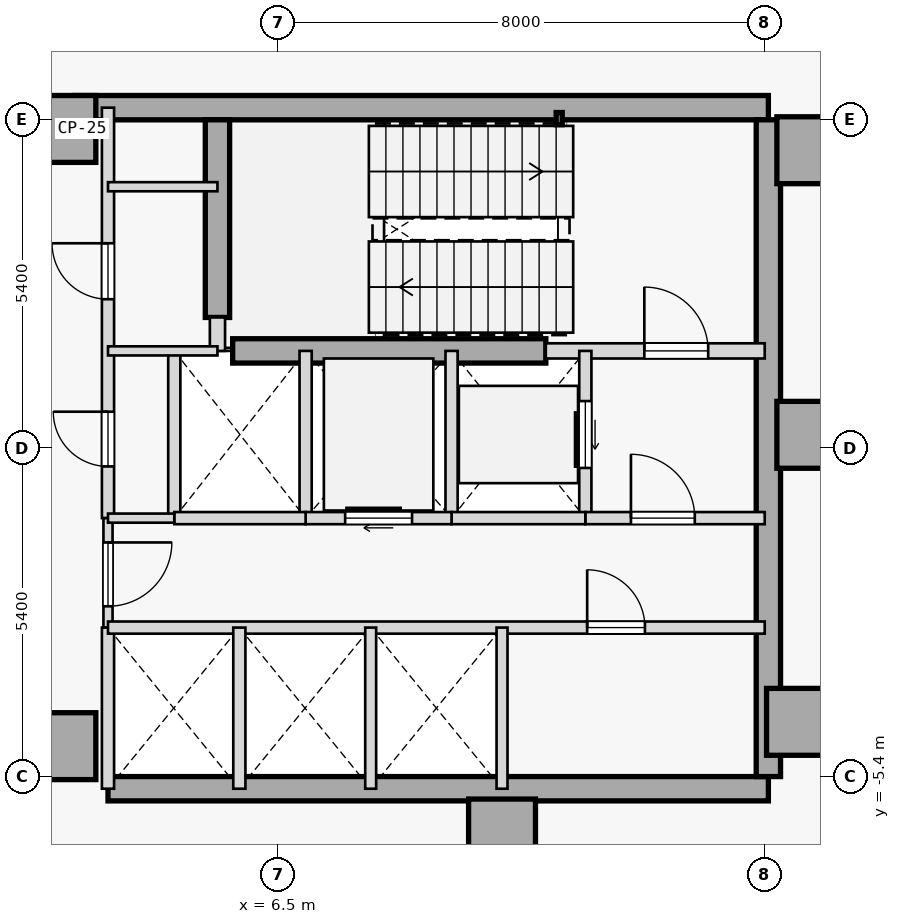
"""IFC4 building model, lengths in metres.
Left out: names, types, materials, properties, quantities, classifications, styles, units other than length and angle.
Written with IfcOpenShell. Run it as: python <this file> out.ifc"""

import sys

from ifc_helpers import new_model, si_unit, direction, frame, frame_2d, origin, origin_2d, place, context, subcontext, project, spatial, rectangle, hollow_rectangle, extrude, element, fill, save


model = new_model("IFC4")
c1 = context("Model", 3, precision=1e-05, world=origin(), true_north=direction((0.0, 1.0)))
c2 = subcontext(c1, "Body", "Model", "MODEL_VIEW")
j1 = project(units=[si_unit("LENGTHUNIT", "METRE"), si_unit("PLANEANGLEUNIT", "RADIAN")], contexts=[c1])
p1 = place(None, origin())
s1 = spatial("IfcSite", under=j1, at=p1, CompositionType="ELEMENT")
p2 = place(p1, origin())
s2 = spatial("IfcBuilding", under=s1, at=p2, CompositionType="ELEMENT")
p3 = place(p2, frame((0.0, 0.0, 202.4)))
s3 = spatial("IfcBuildingStorey", under=s2, at=p3, CompositionType="ELEMENT", Elevation=202.4)
for number, where, z_axis, x_axis in (
    (1, (15.25, 4.9, 0.0), (0.0, 0.0, 1.0), (1.0, 0.0, 0.0)),
    (2, (15.25, 0.22, 0.0), (0.0, 0.0, 1.0), (1.0, 0.0, 0.0)),
    (3, (15.08, -4.5, 0.0), (0.0, 0.0, 1.0), (1.0, 0.0, 0.0)),
    (4, (10.18, -6.32, 0.0), (0.0, 0.0, 1.0), (1.0, 0.0, 0.0)),
    (5, (2.95, -4.9, 0.0), (0.0, 0.0, 1.0), (1.0, 0.0, 0.0)),
    (6, (2.95, 5.25, 0.0), (0.0, 0.0, 1.0), (1.0, 0.0, 0.0)),
):
    element("IfcColumn", number, at=place(p3, frame(where, z_axis=z_axis, x_axis=x_axis)), inside=s3, PredefinedType="COLUMN", context=c2, shape_type="SweptSolid", body=[
        extrude(rectangle(XDim=1.1, YDim=1.1, at=origin_2d()), origin(), (0.0, 0.0, 1.0), 4.4),
    ])
p4 = place(p3, frame((3.15, 5.6, 0.0), z_axis=(0.0, 0.0, 1.0), x_axis=(1.0, 0.0, 0.0)))
e7 = element("IfcWall", 7, at=p4, inside=s3, PredefinedType="SHEAR", context=c2, shape_type="SweptSolid", body=[
    extrude(rectangle(XDim=11.41, YDim=0.4, at=frame_2d((5.705, 0.0))), origin(), (0.0, 0.0, 1.0), 4.15),
])
p5 = place(p3, frame((3.7, -5.6, 0.0), z_axis=(0.0, 0.0, 1.0), x_axis=(1.0, 0.0, 0.0)))
e8 = element("IfcWall", 8, at=p5, inside=s3, PredefinedType="SHEAR", context=c2, shape_type="SweptSolid", body=[
    extrude(rectangle(XDim=10.86, YDim=0.4, at=frame_2d((5.43, 0.0))), origin(), (0.0, 0.0, 1.0), 4.15),
])
p6 = place(p3, frame((14.56, -5.4, 0.0), z_axis=(0.0, 0.0, 1.0), x_axis=(0.0, 1.0, 0.0)))
e9 = element("IfcWall", 9, at=p6, inside=s3, PredefinedType="SHEAR", context=c2, shape_type="SweptSolid", body=[
    extrude(rectangle(XDim=10.8, YDim=0.4, at=frame_2d((5.4, 0.0))), origin(), (0.0, 0.0, 1.0), 4.15),
])
p7 = place(p3, frame((5.5, 2.15, 0.0), z_axis=(0.0, 0.0, 1.0), x_axis=(0.0, 1.0, 0.0)))
e10 = element("IfcWall", 10, at=p7, inside=s3, PredefinedType="SHEAR", context=c2, shape_type="SweptSolid", body=[
    extrude(rectangle(XDim=3.25, YDim=0.4, at=frame_2d((1.625, 0.0))), origin(), (0.0, 0.0, 1.0), 4.15),
])
p8 = place(p3, frame((5.75, 1.6, 0.0), z_axis=(0.0, 0.0, 1.0), x_axis=(1.0, 0.0, 0.0)))
e11 = element("IfcWall", 11, at=p8, inside=s3, PredefinedType="SHEAR", context=c2, shape_type="SweptSolid", body=[
    extrude(rectangle(XDim=5.15, YDim=0.4, at=frame_2d((2.575, 0.0))), origin(), (0.0, 0.0, 1.0), 4.15),
])
p9 = place(p3, frame((11.12, 5.42, 0.0), z_axis=(0.0, 0.0, 1.0), x_axis=(1.0, 0.0, 0.0)))
e12 = element("IfcColumn", 12, at=p9, inside=s3, PredefinedType="COLUMN", context=c2, shape_type="SweptSolid", body=[
    extrude(hollow_rectangle(XDim=0.1, YDim=0.2, WallThickness=0.008, at=origin_2d()), origin(), (0.0, 0.0, 1.0), 4.4),
])
p10 = place(p3, frame((10.9, 1.6, 0.0), z_axis=(0.0, 0.0, 1.0), x_axis=(1.0, 0.0, 0.0)))
e13 = element("IfcWall", 13, at=p10, inside=s3, PredefinedType="STANDARD", context=c2, shape_type="SweptSolid", body=[
    extrude(rectangle(XDim=3.6, YDim=0.25, at=frame_2d((1.8, 0.0))), origin(), (0.0, 0.0, 1.0), 4.15),
])
p11 = place(p10, frame((1.62, 0.0, 0.0)))
e14 = element("IfcOpeningElement", 14, at=p11, cuts=e13, PredefinedType="OPENING", context=c2, shape_type="SweptSolid", body=[
    extrude(rectangle(XDim=1.05, YDim=2.15, at=frame_2d((0.525, 1.075))), frame((0.0, 0.135, 0.0), z_axis=(0.0, -1.0, 0.0), x_axis=(1.0, 0.0, 0.0)), (0.0, 0.0, 1.0), 0.27),
])
p12 = place(p3, frame((5.5, 1.6, 0.0), z_axis=(0.0, 0.0, 1.0), x_axis=(0.0, 1.0, 0.0)))
e15 = element("IfcWall", 15, at=p12, inside=s3, PredefinedType="STANDARD", context=c2, shape_type="SweptSolid", body=[
    extrude(rectangle(XDim=0.55, YDim=0.25, at=frame_2d((0.275, 0.0))), origin(), (0.0, 0.0, 1.0), 4.15),
])
p13 = place(p3, frame((3.7, -1.15, 0.0), z_axis=(0.0, 0.0, 1.0), x_axis=(0.0, 1.0, 0.0)))
e16 = element("IfcWall", 16, at=p13, inside=s3, PredefinedType="STANDARD", context=c2, shape_type="SweptSolid", body=[
    extrude(rectangle(XDim=6.75, YDim=0.2, at=frame_2d((3.375, 0.0))), origin(), (0.0, 0.0, 1.0), 4.15),
])
p14 = place(p13, frame((3.6, 0.0, 0.0)))
e17 = element("IfcOpeningElement", 17, at=p14, cuts=e16, PredefinedType="OPENING", context=c2, shape_type="SweptSolid", body=[
    extrude(rectangle(XDim=0.92, YDim=2.15, at=frame_2d((0.46, 1.075))), frame((0.0, 0.11, 0.0), z_axis=(0.0, -1.0, 0.0), x_axis=(1.0, 0.0, 0.0)), (0.0, 0.0, 1.0), 0.22),
])
p15 = place(p13, frame((0.85, 0.0, 0.0)))
e18 = element("IfcOpeningElement", 18, at=p15, cuts=e16, PredefinedType="OPENING", context=c2, shape_type="SweptSolid", body=[
    extrude(rectangle(XDim=0.9, YDim=2.15, at=frame_2d((0.45, 1.075))), frame((0.0, 0.11, 0.0), z_axis=(0.0, -1.0, 0.0), x_axis=(1.0, 0.0, 0.0)), (0.0, 0.0, 1.0), 0.22),
])
p16 = place(p3, frame((3.7, -2.95, 0.0), z_axis=(0.0, 0.0, 1.0), x_axis=(0.0, 1.0, 0.0)))
e19 = element("IfcWall", 19, at=p16, inside=s3, PredefinedType="PARTITIONING", context=c2, shape_type="SweptSolid", body=[
    extrude(rectangle(XDim=1.8, YDim=0.15, at=frame_2d((0.9, 0.0))), origin(), (0.0, 0.0, 1.0), 4.15),
])
p17 = place(p16, frame((0.35, 0.0, 0.0)))
e20 = element("IfcOpeningElement", 20, at=p17, cuts=e19, PredefinedType="OPENING", context=c2, shape_type="SweptSolid", body=[
    extrude(rectangle(XDim=1.05, YDim=2.18, at=frame_2d((0.525, 1.09))), frame((0.0, 0.085, 0.0), z_axis=(0.0, -1.0, 0.0), x_axis=(1.0, 0.0, 0.0)), (0.0, 0.0, 1.0), 0.17),
])
p18 = place(p3, frame((3.7, -5.6, 0.0), z_axis=(0.0, 0.0, 1.0), x_axis=(0.0, 1.0, 0.0)))
e21 = element("IfcWall", 21, at=p18, inside=s3, PredefinedType="STANDARD", context=c2, shape_type="SweptSolid", body=[
    extrude(rectangle(XDim=2.65, YDim=0.2, at=frame_2d((1.325, 0.0))), origin(), (0.0, 0.0, 1.0), 4.15),
])
p19 = place(p3, frame((11.55, -1.15, 0.0), z_axis=(0.0, 0.0, 1.0), x_axis=(0.0, 1.0, 0.0)))
e22 = element("IfcWall", 22, at=p19, inside=s3, PredefinedType="STANDARD", context=c2, shape_type="SweptSolid", body=[
    extrude(rectangle(XDim=2.75, YDim=0.2, at=frame_2d((1.375, 0.0))), origin(), (0.0, 0.0, 1.0), 4.15),
])
p20 = place(p19, frame((0.825, 0.0, 0.0)))
e23 = element("IfcOpeningElement", 23, at=p20, cuts=e22, PredefinedType="OPENING", context=c2, shape_type="SweptSolid", body=[
    extrude(rectangle(XDim=1.1, YDim=2.15, at=frame_2d((0.55, 1.075))), frame((0.0, 0.11, 0.0), z_axis=(0.0, -1.0, 0.0), x_axis=(1.0, 0.0, 0.0)), (0.0, 0.0, 1.0), 0.22),
])
p21 = place(p3, frame((9.35, -1.15, 0.0), z_axis=(0.0, 0.0, 1.0), x_axis=(0.0, 1.0, 0.0)))
e24 = element("IfcWall", 24, at=p21, inside=s3, PredefinedType="STANDARD", context=c2, shape_type="SweptSolid", body=[
    extrude(rectangle(XDim=2.75, YDim=0.2, at=frame_2d((1.375, 0.0))), origin(), (0.0, 0.0, 1.0), 4.15),
])
p22 = place(p3, frame((11.55, -1.15, 0.0), z_axis=(0.0, 0.0, 1.0), x_axis=(1.0, 0.0, 0.0)))
e25 = element("IfcWall", 25, at=p22, inside=s3, PredefinedType="STANDARD", context=c2, shape_type="SweptSolid", body=[
    extrude(rectangle(XDim=2.95, YDim=0.2, at=frame_2d((1.475, 0.0))), origin(), (0.0, 0.0, 1.0), 4.15),
])
p23 = place(p22, frame((0.75, 0.0, 0.0)))
e26 = element("IfcOpeningElement", 26, at=p23, cuts=e25, PredefinedType="OPENING", context=c2, shape_type="SweptSolid", body=[
    extrude(rectangle(XDim=1.05, YDim=2.18, at=frame_2d((0.525, 1.09))), frame((0.0, 0.11, 0.0), z_axis=(0.0, -1.0, 0.0), x_axis=(1.0, 0.0, 0.0)), (0.0, 0.0, 1.0), 0.22),
])
p24 = place(p3, frame((9.35, -1.15, 0.0), z_axis=(0.0, 0.0, 1.0), x_axis=(1.0, 0.0, 0.0)))
e27 = element("IfcWall", 27, at=p24, inside=s3, PredefinedType="STANDARD", context=c2, shape_type="SweptSolid", body=[
    extrude(rectangle(XDim=2.2, YDim=0.2, at=frame_2d((1.1, 0.0))), origin(), (0.0, 0.0, 1.0), 4.15),
])
p25 = place(p3, frame((6.95, -1.15, 0.0), z_axis=(0.0, 0.0, 1.0), x_axis=(0.0, 1.0, 0.0)))
e28 = element("IfcWall", 28, at=p25, inside=s3, PredefinedType="STANDARD", context=c2, shape_type="SweptSolid", body=[
    extrude(rectangle(XDim=2.75, YDim=0.2, at=frame_2d((1.375, 0.0))), origin(), (0.0, 0.0, 1.0), 4.15),
])
p26 = place(p3, frame((6.95, -1.15, 0.0), z_axis=(0.0, 0.0, 1.0), x_axis=(1.0, 0.0, 0.0)))
e29 = element("IfcWall", 29, at=p26, inside=s3, PredefinedType="STANDARD", context=c2, shape_type="SweptSolid", body=[
    extrude(rectangle(XDim=2.4, YDim=0.2, at=frame_2d((1.2, 0.0))), origin(), (0.0, 0.0, 1.0), 4.15),
])
p27 = place(p26, frame((0.65, 0.0, 0.0)))
e30 = element("IfcOpeningElement", 30, at=p27, cuts=e29, PredefinedType="OPENING", context=c2, shape_type="SweptSolid", body=[
    extrude(rectangle(XDim=1.1, YDim=2.15, at=frame_2d((0.55, 1.075))), frame((0.0, 0.11, 0.0), z_axis=(0.0, -1.0, 0.0), x_axis=(1.0, 0.0, 0.0)), (0.0, 0.0, 1.0), 0.22),
])
p28 = place(p3, frame((4.79, -1.15, 0.0), z_axis=(0.0, 0.0, 1.0), x_axis=(0.0, 1.0, 0.0)))
e31 = element("IfcWall", 31, at=p28, inside=s3, PredefinedType="STANDARD", context=c2, shape_type="SweptSolid", body=[
    extrude(rectangle(XDim=2.75, YDim=0.2, at=frame_2d((1.375, 0.0))), origin(), (0.0, 0.0, 1.0), 4.15),
])
p29 = place(p3, frame((4.79, -1.15, 0.0), z_axis=(0.0, 0.0, 1.0), x_axis=(1.0, 0.0, 0.0)))
e32 = element("IfcWall", 32, at=p29, inside=s3, PredefinedType="STANDARD", context=c2, shape_type="SweptSolid", body=[
    extrude(rectangle(XDim=2.16, YDim=0.2, at=frame_2d((1.08, 0.0))), origin(), (0.0, 0.0, 1.0), 4.15),
])
p30 = place(p3, frame((3.7, -1.15, 0.0), z_axis=(0.0, 0.0, 1.0), x_axis=(1.0, 0.0, 0.0)))
e33 = element("IfcWall", 33, at=p30, inside=s3, PredefinedType="PARTITIONING", context=c2, shape_type="SweptSolid", body=[
    extrude(rectangle(XDim=1.09, YDim=0.15, at=frame_2d((0.545, 0.0))), origin(), (0.0, 0.0, 1.0), 4.15),
])
p31 = place(p3, frame((3.7, -2.95, 0.0), z_axis=(0.0, 0.0, 1.0), x_axis=(1.0, 0.0, 0.0)))
e34 = element("IfcWall", 34, at=p31, inside=s3, PredefinedType="STANDARD", context=c2, shape_type="SweptSolid", body=[
    extrude(rectangle(XDim=10.8, YDim=0.2, at=frame_2d((5.4, 0.0))), origin(), (0.0, 0.0, 1.0), 4.15),
])
p32 = place(p31, frame((7.88, 0.0, 0.0)))
e35 = element("IfcOpeningElement", 35, at=p32, cuts=e34, PredefinedType="OPENING", context=c2, shape_type="SweptSolid", body=[
    extrude(rectangle(XDim=0.95, YDim=2.15, at=frame_2d((0.475, 1.075))), frame((0.0, 0.11, 0.0), z_axis=(0.0, -1.0, 0.0), x_axis=(1.0, 0.0, 0.0)), (0.0, 0.0, 1.0), 0.22),
])
p33 = place(p3, frame((5.86, -5.6, 0.0), z_axis=(0.0, 0.0, 1.0), x_axis=(0.0, 1.0, 0.0)))
e36 = element("IfcWall", 36, at=p33, inside=s3, PredefinedType="STANDARD", context=c2, shape_type="SweptSolid", body=[
    extrude(rectangle(XDim=2.65, YDim=0.2, at=frame_2d((1.325, 0.0))), origin(), (0.0, 0.0, 1.0), 4.15),
])
for number, where, z_axis, x_axis in (
    (37, (10.18, -5.6, 0.0), (0.0, 0.0, 1.0), (0.0, 1.0, 0.0)),
    (38, (8.02, -5.6, 0.0), (0.0, 0.0, 1.0), (0.0, 1.0, 0.0)),
):
    element("IfcWall", number, at=place(p3, frame(where, z_axis=z_axis, x_axis=x_axis)), inside=s3, PredefinedType="STANDARD", context=c2, shape_type="SweptSolid", body=[
        extrude(rectangle(XDim=2.65, YDim=0.18, at=frame_2d((1.325, 0.0))), origin(), (0.0, 0.0, 1.0), 4.15),
    ])
for number, where, z_axis, x_axis in (
    (39, (3.7, 4.3, 0.0), (0.0, 0.0, 1.0), (1.0, 0.0, 0.0)),
    (40, (3.7, 1.6, 0.0), (0.0, 0.0, 1.0), (1.0, 0.0, 0.0)),
):
    element("IfcWall", number, at=place(p3, frame(where, z_axis=z_axis, x_axis=x_axis)), inside=s3, PredefinedType="PARTITIONING", context=c2, shape_type="SweptSolid", body=[
        extrude(rectangle(XDim=1.8, YDim=0.15, at=frame_2d((0.9, 0.0))), origin(), (0.0, 0.0, 1.0), 4.15),
    ])
p34 = place(p11, origin())
e41 = element("IfcDoor", 41, at=p34, inside=s3, OperationType="SINGLE_SWING_LEFT", PredefinedType="DOOR", context=c2, shape_type="SweptSolid", body=[
    extrude(rectangle(XDim=1.05, YDim=2.15, at=frame_2d((0.525, 1.075))), frame((0.0, 0.025, 0.0), z_axis=(0.0, -1.0, 0.0), x_axis=(1.0, 0.0, 0.0)), (0.0, 0.0, 1.0), 0.05),
])
fill(e14, e41)
p35 = place(p23, origin())
e42 = element("IfcDoor", 42, at=p35, inside=s3, OperationType="SINGLE_SWING_LEFT", PredefinedType="DOOR", context=c2, shape_type="SweptSolid", body=[
    extrude(rectangle(XDim=1.05, YDim=2.18, at=frame_2d((0.525, 1.09))), frame((0.0, 0.025, 0.0), z_axis=(0.0, -1.0, 0.0), x_axis=(1.0, 0.0, 0.0)), (0.0, 0.0, 1.0), 0.05),
])
fill(e26, e42)
p36 = place(p17, frame((1.05, 0.0, 0.0), z_axis=(0.0, 0.0, 1.0), x_axis=(-1.0, 0.0, 0.0)))
e43 = element("IfcDoor", 43, at=p36, inside=s3, OperationType="SINGLE_SWING_RIGHT", PredefinedType="DOOR", context=c2, shape_type="SweptSolid", body=[
    extrude(rectangle(XDim=1.05, YDim=2.18, at=frame_2d((0.525, 1.09))), frame((0.0, 0.025, 0.0), z_axis=(0.0, -1.0, 0.0), x_axis=(1.0, 0.0, 0.0)), (0.0, 0.0, 1.0), 0.05),
])
fill(e20, e43)
p37 = place(p20, origin())
e44 = element("IfcDoor", 44, at=p37, inside=s3, OperationType="SLIDING_TO_RIGHT", PredefinedType="DOOR", context=c2, shape_type="SweptSolid", body=[
    extrude(rectangle(XDim=1.1, YDim=2.15, at=frame_2d((0.55, 1.075))), frame((0.0, 0.025, 0.0), z_axis=(0.0, -1.0, 0.0), x_axis=(1.0, 0.0, 0.0)), (0.0, 0.0, 1.0), 0.05),
])
fill(e23, e44)
p38 = place(p27, origin())
e45 = element("IfcDoor", 45, at=p38, inside=s3, OperationType="SLIDING_TO_RIGHT", PredefinedType="DOOR", context=c2, shape_type="SweptSolid", body=[
    extrude(rectangle(XDim=1.1, YDim=2.15, at=frame_2d((0.55, 1.075))), frame((0.0, 0.025, 0.0), z_axis=(0.0, -1.0, 0.0), x_axis=(1.0, 0.0, 0.0)), (0.0, 0.0, 1.0), 0.05),
])
fill(e30, e45)
p39 = place(p32, origin())
e46 = element("IfcDoor", 46, at=p39, inside=s3, OperationType="SINGLE_SWING_LEFT", PredefinedType="DOOR", context=c2, shape_type="SweptSolid", body=[
    extrude(rectangle(XDim=0.95, YDim=2.15, at=frame_2d((0.475, 1.075))), frame((0.0, 0.025, 0.0), z_axis=(0.0, -1.0, 0.0), x_axis=(1.0, 0.0, 0.0)), (0.0, 0.0, 1.0), 0.05),
])
fill(e35, e46)
p40 = place(p14, origin())
e47 = element("IfcDoor", 47, at=p40, inside=s3, OperationType="SINGLE_SWING_RIGHT", PredefinedType="DOOR", context=c2, shape_type="SweptSolid", body=[
    extrude(rectangle(XDim=0.92, YDim=2.15, at=frame_2d((0.46, 1.075))), frame((0.0, 0.025, 0.0), z_axis=(0.0, -1.0, 0.0), x_axis=(1.0, 0.0, 0.0)), (0.0, 0.0, 1.0), 0.05),
])
fill(e17, e47)
p41 = place(p15, origin())
e48 = element("IfcDoor", 48, at=p41, inside=s3, OperationType="SINGLE_SWING_RIGHT", PredefinedType="DOOR", context=c2, shape_type="SweptSolid", body=[
    extrude(rectangle(XDim=0.9, YDim=2.15, at=frame_2d((0.45, 1.075))), frame((0.0, 0.025, 0.0), z_axis=(0.0, -1.0, 0.0), x_axis=(1.0, 0.0, 0.0)), (0.0, 0.0, 1.0), 0.05),
])
fill(e18, e48)
save(model, sys.argv[1])
